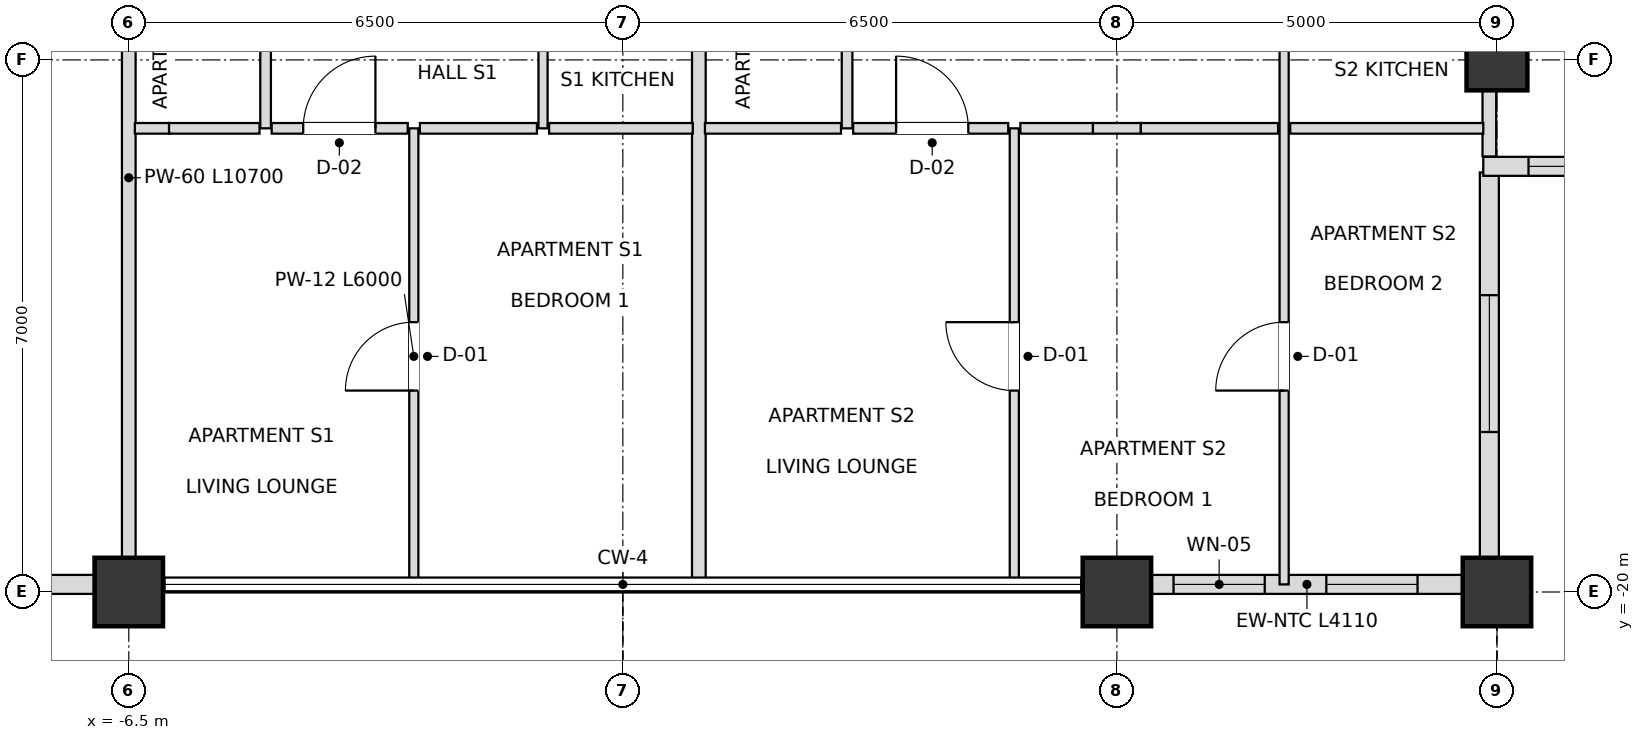
"""IFC4 building model, lengths in metres.
Left out: names, types, materials, properties, quantities, classifications, styles, units other than length and angle.
Written with IfcOpenShell. Run it as: python <this file> out.ifc"""

import sys

from ifc_helpers import new_model, si_unit, direction, frame, frame_2d, origin, origin_2d, place, context, subcontext, project, spatial, rectangle, extrude, element, fill, save


model = new_model("IFC4")
c1 = context("Model", 3, precision=1e-05, world=origin(), true_north=direction((0.0, 1.0)))
c2 = subcontext(c1, "Body", "Model", "MODEL_VIEW")
j1 = project(units=[si_unit("LENGTHUNIT", "METRE"), si_unit("PLANEANGLEUNIT", "RADIAN")], contexts=[c1])
p1 = place(None, origin())
s1 = spatial("IfcSite", under=j1, at=p1, CompositionType="ELEMENT")
p2 = place(p1, origin())
s2 = spatial("IfcBuilding", under=s1, at=p2, CompositionType="ELEMENT")
p3 = place(p2, frame((0.0, 0.0, 301.5)))
s3 = spatial("IfcBuildingStorey", under=s2, at=p3, CompositionType="ELEMENT", Elevation=301.5)
for number, where, z_axis, x_axis in (
    (1, (-6.5, -20.0, 0.0), (0.0, 0.0, 1.0), (1.0, 0.0, 0.0)),
    (2, (6.5, -20.0, 0.0), (0.0, 0.0, 1.0), (1.0, 0.0, 0.0)),
    (3, (11.5, -20.0, 0.0), (0.0, 0.0, 1.0), (1.0, 0.0, 0.0)),
):
    element("IfcColumn", number, at=place(p3, frame(where, z_axis=z_axis, x_axis=x_axis)), inside=s3, PredefinedType="USERDEFINED", context=c2, shape_type="SweptSolid", body=[
        extrude(rectangle(XDim=0.9, YDim=0.9, at=origin_2d()), origin(), (0.0, 0.0, 1.0), 3.6),
    ])
p4 = place(p3, frame((11.5, -13.0, 0.0), z_axis=(0.0, 0.0, 1.0), x_axis=(1.0, 0.0, 0.0)))
e4 = element("IfcColumn", 4, at=p4, inside=s3, PredefinedType="COLUMN", context=c2, shape_type="SweptSolid", body=[
    extrude(rectangle(XDim=0.8, YDim=0.8, at=origin_2d()), origin(), (0.0, 0.0, 1.0), 3.6),
])
p5 = place(p3, frame((-11.055, -19.9, 0.0), z_axis=(0.0, 0.0, 1.0), x_axis=(1.0, 0.0, 0.0)))
e5 = element("IfcWall", 5, at=p5, inside=s3, PredefinedType="SOLIDWALL", context=c2, shape_type="SweptSolid", body=[
    extrude(rectangle(XDim=4.11, YDim=0.25, at=frame_2d((2.055, 0.0))), origin(), (0.0, 0.0, 1.0), 2.668),
])
p6 = place(p5, frame((1.155, 0.0, 0.72)))
e6 = element("IfcOpeningElement", 6, at=p6, cuts=e5, PredefinedType="OPENING", context=c2, shape_type="SweptSolid", body=[
    extrude(rectangle(XDim=1.8, YDim=1.68, at=frame_2d((0.9, 0.84))), frame((0.0, 0.135, 0.0), z_axis=(0.0, -1.0, 0.0), x_axis=(1.0, 0.0, 0.0)), (0.0, 0.0, 1.0), 0.27),
])
p7 = place(p3, frame((6.945, -19.9, 0.0), z_axis=(0.0, 0.0, 1.0), x_axis=(1.0, 0.0, 0.0)))
e7 = element("IfcWall", 7, at=p7, inside=s3, PredefinedType="SOLIDWALL", context=c2, shape_type="SweptSolid", body=[
    extrude(rectangle(XDim=4.11, YDim=0.25, at=frame_2d((2.055, 0.0))), origin(), (0.0, 0.0, 1.0), 2.668),
])
p8 = place(p7, frame((0.3, 0.0, 0.72)))
e8 = element("IfcOpeningElement", 8, at=p8, cuts=e7, PredefinedType="OPENING", context=c2, shape_type="SweptSolid", body=[
    extrude(rectangle(XDim=1.2, YDim=1.68, at=frame_2d((0.6, 0.84))), frame((0.0, 0.135, 0.0), z_axis=(0.0, -1.0, 0.0), x_axis=(1.0, 0.0, 0.0)), (0.0, 0.0, 1.0), 0.27),
])
p9 = place(p7, frame((2.31, 0.0, 0.72)))
e9 = element("IfcOpeningElement", 9, at=p9, cuts=e7, PredefinedType="OPENING", context=c2, shape_type="SweptSolid", body=[
    extrude(rectangle(XDim=1.2, YDim=1.68, at=frame_2d((0.6, 0.84))), frame((0.0, 0.135, 0.0), z_axis=(0.0, -1.0, 0.0), x_axis=(1.0, 0.0, 0.0)), (0.0, 0.0, 1.0), 0.27),
])
p10 = place(p3, frame((11.4, -19.82, 0.0), z_axis=(0.0, 0.0, 1.0), x_axis=(0.0, 1.0, 0.0)))
e10 = element("IfcWall", 10, at=p10, inside=s3, PredefinedType="SOLIDWALL", context=c2, shape_type="SweptSolid", body=[
    extrude(rectangle(XDim=5.34, YDim=0.25, at=frame_2d((2.67, 0.0))), origin(), (0.0, 0.0, 1.0), 2.668),
])
p11 = place(p10, frame((1.925, 0.0, 0.72)))
e11 = element("IfcOpeningElement", 11, at=p11, cuts=e10, PredefinedType="OPENING", context=c2, shape_type="SweptSolid", body=[
    extrude(rectangle(XDim=1.8, YDim=1.68, at=frame_2d((0.9, 0.84))), frame((0.0, 0.135, 0.0), z_axis=(0.0, -1.0, 0.0), x_axis=(1.0, 0.0, 0.0)), (0.0, 0.0, 1.0), 0.27),
])
p12 = place(p3, frame((11.32, -14.4, 0.0), z_axis=(0.0, 0.0, 1.0), x_axis=(1.0, 0.0, 0.0)))
e12 = element("IfcWall", 12, at=p12, inside=s3, PredefinedType="SOLIDWALL", context=c2, shape_type="SweptSolid", body=[
    extrude(rectangle(XDim=5.66, YDim=0.25, at=frame_2d((2.83, 0.0))), origin(), (0.0, 0.0, 1.0), 2.668),
])
p13 = place(p12, frame((0.595, 0.0, 0.72)))
e13 = element("IfcOpeningElement", 13, at=p13, cuts=e12, PredefinedType="OPENING", context=c2, shape_type="SweptSolid", body=[
    extrude(rectangle(XDim=1.8, YDim=1.68, at=frame_2d((0.9, 0.84))), frame((0.0, 0.135, 0.0), z_axis=(0.0, -1.0, 0.0), x_axis=(1.0, 0.0, 0.0)), (0.0, 0.0, 1.0), 0.27),
])
p14 = place(p12, frame((3.265, 0.0, 0.72)))
e14 = element("IfcOpeningElement", 14, at=p14, cuts=e12, PredefinedType="OPENING", context=c2, shape_type="SweptSolid", body=[
    extrude(rectangle(XDim=1.8, YDim=1.68, at=frame_2d((0.9, 0.84))), frame((0.0, 0.135, 0.0), z_axis=(0.0, -1.0, 0.0), x_axis=(1.0, 0.0, 0.0)), (0.0, 0.0, 1.0), 0.27),
])
p15 = place(p3, frame((-6.5, -19.9, 0.0), z_axis=(0.0, 0.0, 1.0), x_axis=(0.0, 1.0, 0.0)))
e15 = element("IfcWall", 15, at=p15, inside=s3, PredefinedType="PARTITIONING", context=c2, shape_type="SweptSolid", body=[
    extrude(rectangle(XDim=10.7, YDim=0.18, at=frame_2d((5.35, 0.0))), origin(), (0.0, 0.0, 1.0), 1.485),
])
p16 = place(p3, frame((-4.7, -13.9, 0.0), z_axis=(0.0, 0.0, 1.0), x_axis=(0.0, 1.0, 0.0)))
e16 = element("IfcWall", 16, at=p16, inside=s3, PredefinedType="PARTITIONING", context=c2, shape_type="SweptSolid", body=[
    extrude(rectangle(XDim=4.7, YDim=0.14, at=frame_2d((2.35, 0.0))), origin(), (0.0, 0.0, 1.0), 3.3),
])
p17 = place(p16, frame((1.9, 0.0, 0.0)))
e17 = element("IfcOpeningElement", 17, at=p17, cuts=e16, PredefinedType="OPENING", context=c2, shape_type="SweptSolid", body=[
    extrude(rectangle(XDim=0.9, YDim=2.1, at=frame_2d((0.45, 1.05))), frame((0.0, 0.08, 0.0), z_axis=(0.0, -1.0, 0.0), x_axis=(1.0, 0.0, 0.0)), (0.0, 0.0, 1.0), 0.16),
])
p18 = place(p3, frame((-2.75, -19.9, 0.0), z_axis=(0.0, 0.0, 1.0), x_axis=(0.0, 1.0, 0.0)))
e18 = element("IfcWall", 18, at=p18, inside=s3, PredefinedType="PARTITIONING", context=c2, shape_type="SweptSolid", body=[
    extrude(rectangle(XDim=6.0, YDim=0.12, at=frame_2d((3.0, 0.0))), origin(), (0.0, 0.0, 1.0), 3.3),
])
p19 = place(p18, frame((2.55, 0.0, 0.0)))
e19 = element("IfcOpeningElement", 19, at=p19, cuts=e18, PredefinedType="OPENING", context=c2, shape_type="SweptSolid", body=[
    extrude(rectangle(XDim=0.9, YDim=2.1, at=frame_2d((0.45, 1.05))), frame((0.0, 0.07, 0.0), z_axis=(0.0, -1.0, 0.0), x_axis=(1.0, 0.0, 0.0)), (0.0, 0.0, 1.0), 0.14),
])
p20 = place(p3, frame((-1.05, -13.9, 0.0), z_axis=(0.0, 0.0, 1.0), x_axis=(0.0, 1.0, 0.0)))
e20 = element("IfcWall", 20, at=p20, inside=s3, PredefinedType="PARTITIONING", context=c2, shape_type="SweptSolid", body=[
    extrude(rectangle(XDim=4.7, YDim=0.12, at=frame_2d((2.35, 0.0))), origin(), (0.0, 0.0, 1.0), 3.3),
])
p21 = place(p20, frame((1.875, 0.0, 0.0)))
e21 = element("IfcOpeningElement", 21, at=p21, cuts=e20, PredefinedType="OPENING", context=c2, shape_type="SweptSolid", body=[
    extrude(rectangle(XDim=0.95, YDim=2.1, at=frame_2d((0.475, 1.05))), frame((0.0, 0.07, 0.0), z_axis=(0.0, -1.0, 0.0), x_axis=(1.0, 0.0, 0.0)), (0.0, 0.0, 1.0), 0.14),
])
p22 = place(p3, frame((1.0, -19.9, 0.0), z_axis=(0.0, 0.0, 1.0), x_axis=(0.0, 1.0, 0.0)))
e22 = element("IfcWall", 22, at=p22, inside=s3, PredefinedType="PARTITIONING", context=c2, shape_type="SweptSolid", body=[
    extrude(rectangle(XDim=10.7, YDim=0.18, at=frame_2d((5.35, 0.0))), origin(), (0.0, 0.0, 1.0), 3.3),
])
p23 = place(p3, frame((2.95, -13.9, 0.0), z_axis=(0.0, 0.0, 1.0), x_axis=(0.0, 1.0, 0.0)))
e23 = element("IfcWall", 23, at=p23, inside=s3, PredefinedType="PARTITIONING", context=c2, shape_type="SweptSolid", body=[
    extrude(rectangle(XDim=4.7, YDim=0.14, at=frame_2d((2.35, 0.0))), origin(), (0.0, 0.0, 1.0), 3.3),
])
p24 = place(p23, frame((1.9, 0.0, 0.0)))
e24 = element("IfcOpeningElement", 24, at=p24, cuts=e23, PredefinedType="OPENING", context=c2, shape_type="SweptSolid", body=[
    extrude(rectangle(XDim=0.9, YDim=2.1, at=frame_2d((0.45, 1.05))), frame((0.0, 0.08, 0.0), z_axis=(0.0, -1.0, 0.0), x_axis=(1.0, 0.0, 0.0)), (0.0, 0.0, 1.0), 0.16),
])
p25 = place(p3, frame((5.15, -19.9, 0.0), z_axis=(0.0, 0.0, 1.0), x_axis=(0.0, 1.0, 0.0)))
e25 = element("IfcWall", 25, at=p25, inside=s3, PredefinedType="PARTITIONING", context=c2, shape_type="SweptSolid", body=[
    extrude(rectangle(XDim=6.0, YDim=0.12, at=frame_2d((3.0, 0.0))), origin(), (0.0, 0.0, 1.0), 3.3),
])
p26 = place(p25, frame((2.55, 0.0, 0.0)))
e26 = element("IfcOpeningElement", 26, at=p26, cuts=e25, PredefinedType="OPENING", context=c2, shape_type="SweptSolid", body=[
    extrude(rectangle(XDim=0.9, YDim=2.1, at=frame_2d((0.45, 1.05))), frame((0.0, 0.07, 0.0), z_axis=(0.0, -1.0, 0.0), x_axis=(1.0, 0.0, 0.0)), (0.0, 0.0, 1.0), 0.14),
])
p27 = place(p3, frame((8.7, -19.9, 0.0), z_axis=(0.0, 0.0, 1.0), x_axis=(0.0, 1.0, 0.0)))
e27 = element("IfcWall", 27, at=p27, inside=s3, PredefinedType="PARTITIONING", context=c2, shape_type="SweptSolid", body=[
    extrude(rectangle(XDim=10.7, YDim=0.12, at=frame_2d((5.35, 0.0))), origin(), (0.0, 0.0, 1.0), 2.353),
])
p28 = place(p27, frame((7.875, 0.0, 0.0)))
e28 = element("IfcOpeningElement", 28, at=p28, cuts=e27, PredefinedType="OPENING", context=c2, shape_type="SweptSolid", body=[
    extrude(rectangle(XDim=0.95, YDim=2.1, at=frame_2d((0.475, 1.05))), frame((0.0, 0.07, 0.0), z_axis=(0.0, -1.0, 0.0), x_axis=(1.0, 0.0, 0.0)), (0.0, 0.0, 1.0), 0.14),
])
p29 = place(p27, frame((2.55, 0.0, 0.0)))
e29 = element("IfcOpeningElement", 29, at=p29, cuts=e27, PredefinedType="OPENING", context=c2, shape_type="SweptSolid", body=[
    extrude(rectangle(XDim=0.9, YDim=2.1, at=frame_2d((0.45, 1.05))), frame((0.0, 0.07, 0.0), z_axis=(0.0, -1.0, 0.0), x_axis=(1.0, 0.0, 0.0)), (0.0, 0.0, 1.0), 0.14),
])
p30 = place(p3, frame((11.4, -14.27, 0.0), z_axis=(0.0, 0.0, 1.0), x_axis=(0.0, 1.0, 0.0)))
e30 = element("IfcWall", 30, at=p30, inside=s3, PredefinedType="PARTITIONING", context=c2, shape_type="SweptSolid", body=[
    extrude(rectangle(XDim=5.07, YDim=0.18, at=frame_2d((2.535, 0.0))), origin(), (0.0, 0.0, 1.0), 2.353),
])
p31 = place(p3, frame((-6.42, -13.9, 0.0), z_axis=(0.0, 0.0, 1.0), x_axis=(1.0, 0.0, 0.0)))
e31 = element("IfcWall", 31, at=p31, inside=s3, PredefinedType="PARTITIONING", context=c2, shape_type="SweptSolid", body=[
    extrude(rectangle(XDim=0.45, YDim=0.14, at=frame_2d((0.225, 0.0))), origin(), (0.0, 0.0, 1.0), 1.485),
])
p32 = place(p3, frame((-5.97, -13.9, 0.0), z_axis=(0.0, 0.0, 1.0), x_axis=(1.0, 0.0, 0.0)))
e32 = element("IfcWall", 32, at=p32, inside=s3, PredefinedType="PARTITIONING", context=c2, shape_type="SweptSolid", body=[
    extrude(rectangle(XDim=1.19, YDim=0.14, at=frame_2d((0.595, 0.0))), origin(), (0.0, 0.0, 1.0), 3.3),
])
p33 = place(p3, frame((-4.62, -13.9, 0.0), z_axis=(0.0, 0.0, 1.0), x_axis=(1.0, 0.0, 0.0)))
e33 = element("IfcWall", 33, at=p33, inside=s3, PredefinedType="PARTITIONING", context=c2, shape_type="SweptSolid", body=[
    extrude(rectangle(XDim=1.79, YDim=0.14, at=frame_2d((0.895, 0.0))), origin(), (0.0, 0.0, 1.0), 3.3),
])
p34 = place(p33, frame((0.415, 0.0, 0.0)))
e34 = element("IfcOpeningElement", 34, at=p34, cuts=e33, PredefinedType="OPENING", context=c2, shape_type="SweptSolid", body=[
    extrude(rectangle(XDim=0.95, YDim=2.1, at=frame_2d((0.475, 1.05))), frame((0.0, 0.08, 0.0), z_axis=(0.0, -1.0, 0.0), x_axis=(1.0, 0.0, 0.0)), (0.0, 0.0, 1.0), 0.16),
])
p35 = place(p3, frame((-2.67, -13.9, 0.0), z_axis=(0.0, 0.0, 1.0), x_axis=(1.0, 0.0, 0.0)))
e35 = element("IfcWall", 35, at=p35, inside=s3, PredefinedType="PARTITIONING", context=c2, shape_type="SweptSolid", body=[
    extrude(rectangle(XDim=1.54, YDim=0.14, at=frame_2d((0.77, 0.0))), origin(), (0.0, 0.0, 1.0), 3.3),
])
p36 = place(p3, frame((-0.97, -13.9, 0.0), z_axis=(0.0, 0.0, 1.0), x_axis=(1.0, 0.0, 0.0)))
e36 = element("IfcWall", 36, at=p36, inside=s3, PredefinedType="PARTITIONING", context=c2, shape_type="SweptSolid", body=[
    extrude(rectangle(XDim=1.89, YDim=0.14, at=frame_2d((0.945, 0.0))), origin(), (0.0, 0.0, 1.0), 3.3),
])
p37 = place(p3, frame((1.08, -13.9, 0.0), z_axis=(0.0, 0.0, 1.0), x_axis=(1.0, 0.0, 0.0)))
e37 = element("IfcWall", 37, at=p37, inside=s3, PredefinedType="PARTITIONING", context=c2, shape_type="SweptSolid", body=[
    extrude(rectangle(XDim=1.79, YDim=0.14, at=frame_2d((0.895, 0.0))), origin(), (0.0, 0.0, 1.0), 3.3),
])
p38 = place(p3, frame((3.03, -13.9, 0.0), z_axis=(0.0, 0.0, 1.0), x_axis=(1.0, 0.0, 0.0)))
e38 = element("IfcWall", 38, at=p38, inside=s3, PredefinedType="PARTITIONING", context=c2, shape_type="SweptSolid", body=[
    extrude(rectangle(XDim=2.04, YDim=0.14, at=frame_2d((1.02, 0.0))), origin(), (0.0, 0.0, 1.0), 3.3),
])
p39 = place(p38, frame((0.565, 0.0, 0.0)))
e39 = element("IfcOpeningElement", 39, at=p39, cuts=e38, PredefinedType="OPENING", context=c2, shape_type="SweptSolid", body=[
    extrude(rectangle(XDim=0.95, YDim=2.1, at=frame_2d((0.475, 1.05))), frame((0.0, 0.08, 0.0), z_axis=(0.0, -1.0, 0.0), x_axis=(1.0, 0.0, 0.0)), (0.0, 0.0, 1.0), 0.16),
])
p40 = place(p3, frame((5.23, -13.9, 0.0), z_axis=(0.0, 0.0, 1.0), x_axis=(1.0, 0.0, 0.0)))
e40 = element("IfcWall", 40, at=p40, inside=s3, PredefinedType="PARTITIONING", context=c2, shape_type="SweptSolid", body=[
    extrude(rectangle(XDim=0.955, YDim=0.14, at=frame_2d((0.478, 0.0))), origin(), (0.0, 0.0, 1.0), 3.3),
])
p41 = place(p3, frame((6.185, -13.9, 0.0), z_axis=(0.0, 0.0, 1.0), x_axis=(1.0, 0.0, 0.0)))
e41 = element("IfcWall", 41, at=p41, inside=s3, PredefinedType="PARTITIONING", context=c2, shape_type="SweptSolid", body=[
    extrude(rectangle(XDim=0.63, YDim=0.14, at=frame_2d((0.315, 0.0))), origin(), (0.0, 0.0, 1.0), 1.485),
])
p42 = place(p3, frame((6.815, -13.9, 0.0), z_axis=(0.0, 0.0, 1.0), x_axis=(1.0, 0.0, 0.0)))
e42 = element("IfcWall", 42, at=p42, inside=s3, PredefinedType="PARTITIONING", context=c2, shape_type="SweptSolid", body=[
    extrude(rectangle(XDim=1.805, YDim=0.14, at=frame_2d((0.903, 0.0))), origin(), (0.0, 0.0, 1.0), 3.3),
])
p43 = place(p3, frame((8.78, -13.9, 0.0), z_axis=(0.0, 0.0, 1.0), x_axis=(1.0, 0.0, 0.0)))
e43 = element("IfcWall", 43, at=p43, inside=s3, PredefinedType="PARTITIONING", context=c2, shape_type="SweptSolid", body=[
    extrude(rectangle(XDim=2.54, YDim=0.14, at=frame_2d((1.27, 0.0))), origin(), (0.0, 0.0, 1.0), 3.3),
])
p44 = place(p8, origin())
e44 = element("IfcWindow", 44, at=p44, inside=s3, PartitioningType="SINGLE_PANEL", PredefinedType="WINDOW", context=c2, shape_type="SweptSolid", body=[
    extrude(rectangle(XDim=1.2, YDim=1.68, at=frame_2d((0.6, 0.84))), frame((0.0, 0.03, 0.0), z_axis=(0.0, -1.0, 0.0), x_axis=(1.0, 0.0, 0.0)), (0.0, 0.0, 1.0), 0.06),
])
fill(e8, e44)
p45 = place(p9, origin())
e45 = element("IfcWindow", 45, at=p45, inside=s3, PartitioningType="SINGLE_PANEL", PredefinedType="WINDOW", context=c2, shape_type="SweptSolid", body=[
    extrude(rectangle(XDim=1.2, YDim=1.68, at=frame_2d((0.6, 0.84))), frame((0.0, 0.03, 0.0), z_axis=(0.0, -1.0, 0.0), x_axis=(1.0, 0.0, 0.0)), (0.0, 0.0, 1.0), 0.06),
])
fill(e9, e45)
p46 = place(p11, origin())
e46 = element("IfcWindow", 46, at=p46, inside=s3, PartitioningType="SINGLE_PANEL", PredefinedType="WINDOW", context=c2, shape_type="SweptSolid", body=[
    extrude(rectangle(XDim=1.8, YDim=1.68, at=frame_2d((0.9, 0.84))), frame((0.0, 0.03, 0.0), z_axis=(0.0, -1.0, 0.0), x_axis=(1.0, 0.0, 0.0)), (0.0, 0.0, 1.0), 0.06),
])
fill(e11, e46)
p47 = place(p13, origin())
e47 = element("IfcWindow", 47, at=p47, inside=s3, PartitioningType="SINGLE_PANEL", PredefinedType="WINDOW", context=c2, shape_type="SweptSolid", body=[
    extrude(rectangle(XDim=1.8, YDim=1.68, at=frame_2d((0.9, 0.84))), frame((0.0, 0.03, 0.0), z_axis=(0.0, -1.0, 0.0), x_axis=(1.0, 0.0, 0.0)), (0.0, 0.0, 1.0), 0.06),
])
fill(e13, e47)
p48 = place(p34, origin())
e48 = element("IfcDoor", 48, at=p48, inside=s3, OperationType="SINGLE_SWING_RIGHT", PredefinedType="DOOR", context=c2, shape_type="SweptSolid", body=[
    extrude(rectangle(XDim=0.95, YDim=2.1, at=frame_2d((0.475, 1.05))), frame((0.0, 0.025, 0.0), z_axis=(0.0, -1.0, 0.0), x_axis=(1.0, 0.0, 0.0)), (0.0, 0.0, 1.0), 0.05),
])
fill(e34, e48)
p49 = place(p19, origin())
e49 = element("IfcDoor", 49, at=p49, inside=s3, OperationType="SINGLE_SWING_LEFT", PredefinedType="DOOR", context=c2, shape_type="SweptSolid", body=[
    extrude(rectangle(XDim=0.9, YDim=2.1, at=frame_2d((0.45, 1.05))), frame((0.0, 0.025, 0.0), z_axis=(0.0, -1.0, 0.0), x_axis=(1.0, 0.0, 0.0)), (0.0, 0.0, 1.0), 0.05),
])
fill(e19, e49)
p50 = place(p39, origin())
e50 = element("IfcDoor", 50, at=p50, inside=s3, OperationType="SINGLE_SWING_LEFT", PredefinedType="DOOR", context=c2, shape_type="SweptSolid", body=[
    extrude(rectangle(XDim=0.95, YDim=2.1, at=frame_2d((0.475, 1.05))), frame((0.0, 0.025, 0.0), z_axis=(0.0, -1.0, 0.0), x_axis=(1.0, 0.0, 0.0)), (0.0, 0.0, 1.0), 0.05),
])
fill(e39, e50)
p51 = place(p26, origin())
e51 = element("IfcDoor", 51, at=p51, inside=s3, OperationType="SINGLE_SWING_RIGHT", PredefinedType="DOOR", context=c2, shape_type="SweptSolid", body=[
    extrude(rectangle(XDim=0.9, YDim=2.1, at=frame_2d((0.45, 1.05))), frame((0.0, 0.025, 0.0), z_axis=(0.0, -1.0, 0.0), x_axis=(1.0, 0.0, 0.0)), (0.0, 0.0, 1.0), 0.05),
])
fill(e26, e51)
p52 = place(p29, origin())
e52 = element("IfcDoor", 52, at=p52, inside=s3, OperationType="SINGLE_SWING_LEFT", PredefinedType="DOOR", context=c2, shape_type="SweptSolid", body=[
    extrude(rectangle(XDim=0.9, YDim=2.1, at=frame_2d((0.45, 1.05))), frame((0.0, 0.025, 0.0), z_axis=(0.0, -1.0, 0.0), x_axis=(1.0, 0.0, 0.0)), (0.0, 0.0, 1.0), 0.05),
])
fill(e29, e52)
save(model, sys.argv[1])
